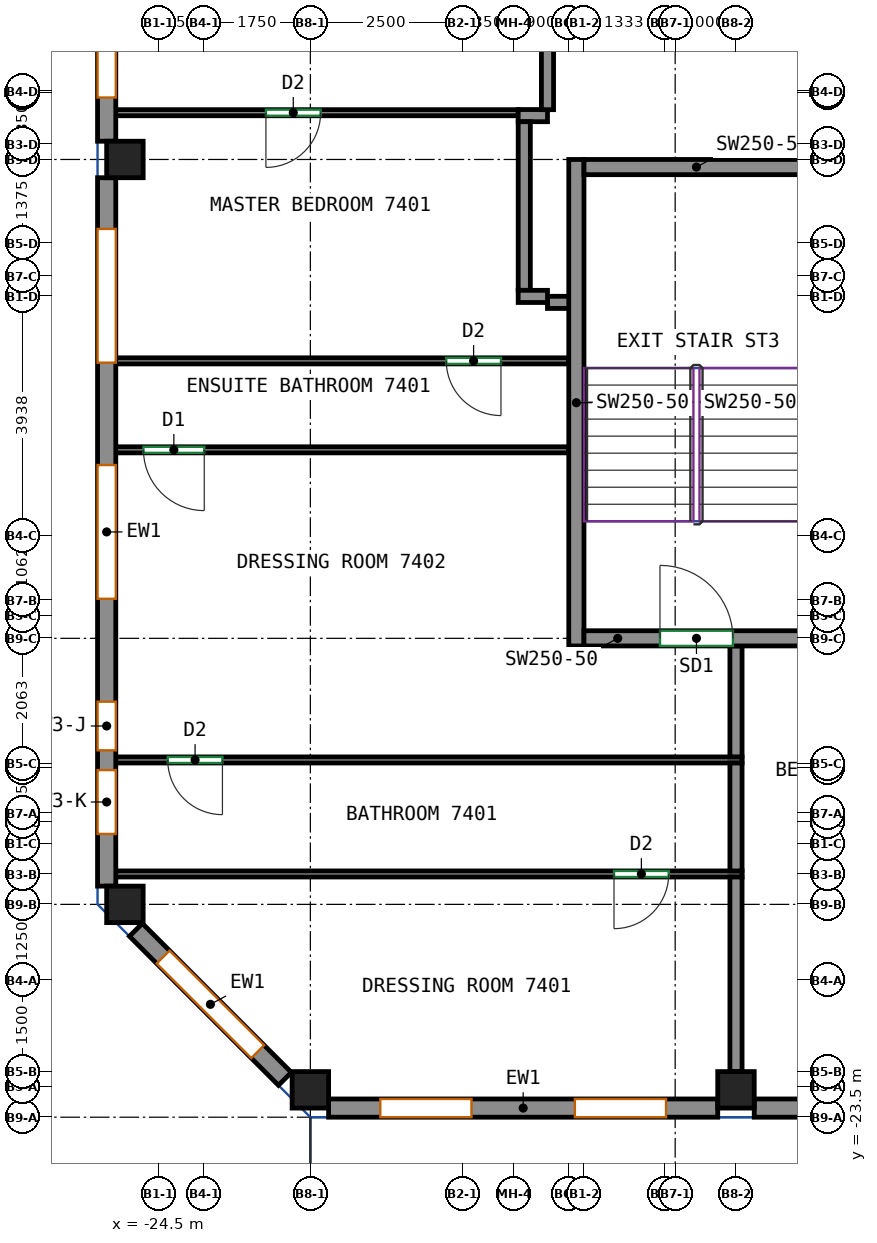
"""IFC4 building model, lengths in metres.
Left out: names, types, materials, properties, quantities, classifications, styles, units other than length and angle.
Written with IfcOpenShell. Run it as: python <this file> out.ifc"""

import sys

from ifc_helpers import new_model, si_unit, direction, frame, frame_2d, origin, origin_2d, place, context, subcontext, project, spatial, rectangle, extrude, source, transform, mapped, element, fill, save


model = new_model("IFC4")
c1 = context("Model", 3, precision=1e-05, world=origin(), true_north=direction((0.0, 1.0)))
c2 = subcontext(c1, "Body", "Model", "MODEL_VIEW")
j1 = project(units=[si_unit("LENGTHUNIT", "METRE"), si_unit("PLANEANGLEUNIT", "RADIAN")], contexts=[c1])
p1 = place(None, origin())
s1 = spatial("IfcSite", under=j1, at=p1, CompositionType="ELEMENT")
p2 = place(p1, origin())
s2 = spatial("IfcBuilding", under=s1, at=p2, CompositionType="ELEMENT")
p3 = place(p2, frame((0.0, 0.0, 298.4)))
s3 = spatial("IfcBuildingStorey", under=s2, at=p3, CompositionType="ELEMENT", Elevation=298.4)
m1 = source(origin(), c2, "Body", "SweptSolid", [
    extrude(rectangle(XDim=0.6, YDim=0.6, at=origin_2d()), origin(), (0.0, 0.0, 1.0), 3.12),
])
for number, where, z_axis, x_axis in (
    (1, (-25.05, -20.0, 0.0), (0.0, 0.0, 1.0), (1.0, 0.0, 0.0)),
    (2, (-25.05, -7.75, 0.0), (0.0, 0.0, 1.0), (1.0, 0.0, 0.0)),
    (3, (-22.0, -23.05, 0.0), (0.0, 0.0, 1.0), (1.0, 0.0, 0.0)),
    (4, (-15.0, -23.05, 0.0), (0.0, 0.0, 1.0), (1.0, 0.0, 0.0)),
):
    element("IfcColumn", number, at=place(p3, frame(where, z_axis=z_axis, x_axis=x_axis)), inside=s3, PredefinedType="COLUMN", context=c2, shape_type="MappedRepresentation", body=[
        mapped(m1, transform((0.0, 0.0, 0.0))),
    ])
m2 = source(origin(), c2, "Body", "SweptSolid", [
    extrude(rectangle(XDim=8.0, YDim=0.25, at=frame_2d((4.0, 0.0))), origin(), (0.0, 0.0, 1.0), 3.12),
])
p4 = place(p3, frame((-17.625, -15.75, 0.0), z_axis=(0.0, 0.0, 1.0), x_axis=(0.0, 1.0, 0.0)))
e5 = element("IfcWall", 5, at=p4, inside=s3, PredefinedType="SHEAR", context=c2, shape_type="MappedRepresentation", body=[
    mapped(m2, transform((0.0, 0.0, 0.0))),
])
m3 = source(origin(), c2, "Body", "SweptSolid", [
    extrude(rectangle(XDim=3.7, YDim=0.25, at=frame_2d((1.85, 0.0))), origin(), (0.0, 0.0, 1.0), 3.12),
])
p5 = place(p3, frame((-17.5, -15.625, 0.0), z_axis=(0.0, 0.0, 1.0), x_axis=(1.0, 0.0, 0.0)))
e6 = element("IfcWall", 6, at=p5, inside=s3, PredefinedType="SHEAR", context=c2, shape_type="MappedRepresentation", body=[
    mapped(m3, transform((0.0, 0.0, 0.0))),
])
p6 = place(p5, frame((1.25, 0.0, 0.0)))
e7 = element("IfcOpeningElement", 7, at=p6, cuts=e6, PredefinedType="OPENING", context=c2, shape_type="SweptSolid", body=[
    extrude(rectangle(XDim=1.2, YDim=2.1, at=frame_2d((0.6, 1.05))), frame((0.0, 0.135, 0.0), z_axis=(0.0, -1.0, 0.0), x_axis=(1.0, 0.0, 0.0)), (0.0, 0.0, 1.0), 0.27),
])
p7 = place(p3, frame((-17.5, -7.875, 0.0), z_axis=(0.0, 0.0, 1.0), x_axis=(1.0, 0.0, 0.0)))
e8 = element("IfcWall", 8, at=p7, inside=s3, PredefinedType="SHEAR", context=c2, shape_type="MappedRepresentation", body=[
    mapped(m3, transform((0.0, 0.0, 0.0))),
])
m4 = source(origin(), c2, "Body", "SweptSolid", [
    extrude(rectangle(XDim=6.4, YDim=0.3, at=frame_2d((3.2, 0.0))), origin(), (0.0, 0.0, 1.0), 3.12),
])
p8 = place(p3, frame((-21.7, -23.35, 0.0), z_axis=(0.0, 0.0, 1.0), x_axis=(1.0, 0.0, 0.0)))
e9 = element("IfcWall", 9, at=p8, inside=s3, PredefinedType="SOLIDWALL", context=c2, shape_type="MappedRepresentation", body=[
    mapped(m4, transform((0.0, 0.0, 0.0))),
])
p9 = place(p8, frame((0.85, 0.0, 0.8)))
e10 = element("IfcOpeningElement", 10, at=p9, cuts=e9, PredefinedType="OPENING", context=c2, shape_type="SweptSolid", body=[
    extrude(rectangle(XDim=1.5, YDim=2.05, at=frame_2d((0.75, 1.025))), frame((0.0, 0.16, 0.0), z_axis=(0.0, -1.0, 0.0), x_axis=(1.0, 0.0, 0.0)), (0.0, 0.0, 1.0), 0.32),
])
p10 = place(p8, frame((4.05, 0.0, 0.8)))
e11 = element("IfcOpeningElement", 11, at=p10, cuts=e9, PredefinedType="OPENING", context=c2, shape_type="SweptSolid", body=[
    extrude(rectangle(XDim=1.5, YDim=2.05, at=frame_2d((0.75, 1.025))), frame((0.0, 0.16, 0.0), z_axis=(0.0, -1.0, 0.0), x_axis=(1.0, 0.0, 0.0)), (0.0, 0.0, 1.0), 0.32),
])
p11 = place(p3, frame((-14.7, -23.35, 0.0), z_axis=(0.0, 0.0, 1.0), x_axis=(1.0, 0.0, 0.0)))
e12 = element("IfcWall", 12, at=p11, inside=s3, PredefinedType="SOLIDWALL", context=c2, shape_type="MappedRepresentation", body=[
    mapped(m4, transform((0.0, 0.0, 0.0))),
])
p12 = place(p11, frame((0.85, 0.0, 0.8)))
e13 = element("IfcOpeningElement", 13, at=p12, cuts=e12, PredefinedType="OPENING", context=c2, shape_type="SweptSolid", body=[
    extrude(rectangle(XDim=1.5, YDim=2.05, at=frame_2d((0.75, 1.025))), frame((0.0, 0.16, 0.0), z_axis=(0.0, -1.0, 0.0), x_axis=(1.0, 0.0, 0.0)), (0.0, 0.0, 1.0), 0.32),
])
p13 = place(p11, frame((4.05, 0.0, 0.8)))
e14 = element("IfcOpeningElement", 14, at=p13, cuts=e12, PredefinedType="OPENING", context=c2, shape_type="SweptSolid", body=[
    extrude(rectangle(XDim=1.5, YDim=2.05, at=frame_2d((0.75, 1.025))), frame((0.0, 0.16, 0.0), z_axis=(0.0, -1.0, 0.0), x_axis=(1.0, 0.0, 0.0)), (0.0, 0.0, 1.0), 0.32),
])
m5 = source(origin(), c2, "Body", "SweptSolid", [
    extrude(rectangle(XDim=7.275, YDim=0.3, at=frame_2d((3.637, 0.0))), origin(), (0.0, 0.0, 1.0), 3.12),
])
p14 = place(p3, frame((-25.35, -0.175, 0.0), z_axis=(0.0, 0.0, 1.0), x_axis=(0.0, -1.0, 0.0)))
e15 = element("IfcWall", 15, at=p14, inside=s3, PredefinedType="SOLIDWALL", context=c2, shape_type="MappedRepresentation", body=[
    mapped(m5, transform((0.0, 0.0, 0.0))),
])
p15 = place(p14, frame((0.719, 0.0, 0.8)))
e16 = element("IfcOpeningElement", 16, at=p15, cuts=e15, PredefinedType="OPENING", context=c2, shape_type="SweptSolid", body=[
    extrude(rectangle(XDim=2.2, YDim=2.05, at=frame_2d((1.1, 1.025))), frame((0.0, 0.16, 0.0), z_axis=(0.0, -1.0, 0.0), x_axis=(1.0, 0.0, 0.0)), (0.0, 0.0, 1.0), 0.32),
])
p16 = place(p14, frame((4.356, 0.0, 0.8)))
e17 = element("IfcOpeningElement", 17, at=p16, cuts=e15, PredefinedType="OPENING", context=c2, shape_type="SweptSolid", body=[
    extrude(rectangle(XDim=2.2, YDim=2.05, at=frame_2d((1.1, 1.025))), frame((0.0, 0.16, 0.0), z_axis=(0.0, -1.0, 0.0), x_axis=(1.0, 0.0, 0.0)), (0.0, 0.0, 1.0), 0.32),
])
m6 = source(origin(), c2, "Body", "SweptSolid", [
    extrude(rectangle(XDim=11.65, YDim=0.3, at=frame_2d((5.825, 0.0))), origin(), (0.0, 0.0, 1.0), 3.12),
])
p17 = place(p3, frame((-25.35, -8.05, 0.0), z_axis=(0.0, 0.0, 1.0), x_axis=(0.0, -1.0, 0.0)))
e18 = element("IfcWall", 18, at=p17, inside=s3, PredefinedType="SOLIDWALL", context=c2, shape_type="MappedRepresentation", body=[
    mapped(m6, transform((0.0, 0.0, 0.0))),
])
p18 = place(p17, frame((0.842, 0.0, 0.8)))
e19 = element("IfcOpeningElement", 19, at=p18, cuts=e18, PredefinedType="OPENING", context=c2, shape_type="SweptSolid", body=[
    extrude(rectangle(XDim=2.2, YDim=2.05, at=frame_2d((1.1, 1.025))), frame((0.0, 0.16, 0.0), z_axis=(0.0, -1.0, 0.0), x_axis=(1.0, 0.0, 0.0)), (0.0, 0.0, 1.0), 0.32),
])
p19 = place(p17, frame((4.725, 0.0, 0.8)))
e20 = element("IfcOpeningElement", 20, at=p19, cuts=e18, PredefinedType="OPENING", context=c2, shape_type="SweptSolid", body=[
    extrude(rectangle(XDim=2.2, YDim=2.05, at=frame_2d((1.1, 1.025))), frame((0.0, 0.16, 0.0), z_axis=(0.0, -1.0, 0.0), x_axis=(1.0, 0.0, 0.0)), (0.0, 0.0, 1.0), 0.32),
])
p20 = place(p17, frame((8.617, 0.0, 0.8)))
e21 = element("IfcOpeningElement", 21, at=p20, cuts=e18, PredefinedType="OPENING", context=c2, shape_type="SweptSolid", body=[
    extrude(rectangle(XDim=0.8, YDim=2.05, at=frame_2d((0.4, 1.025))), frame((0.0, 0.16, 0.0), z_axis=(0.0, -1.0, 0.0), x_axis=(1.0, 0.0, 0.0)), (0.0, 0.0, 1.0), 0.32),
])
p21 = place(p17, frame((9.742, 0.0, 0.8)))
e22 = element("IfcOpeningElement", 22, at=p21, cuts=e18, PredefinedType="OPENING", context=c2, shape_type="SweptSolid", body=[
    extrude(rectangle(XDim=1.05, YDim=2.05, at=frame_2d((0.525, 1.025))), frame((0.0, 0.16, 0.0), z_axis=(0.0, -1.0, 0.0), x_axis=(1.0, 0.0, 0.0)), (0.0, 0.0, 1.0), 0.32),
])
m7 = source(origin(), c2, "Body", "SweptSolid", [
    extrude(rectangle(XDim=3.465, YDim=0.3, at=frame_2d((1.732, 0.0))), origin(), (0.0, 0.0, 1.0), 3.12),
])
p22 = place(p3, frame((-24.869, -20.419, 0.0), z_axis=(0.0, 0.0, 1.0), x_axis=(0.707106781187, -0.707106781187, 0.0)))
e23 = element("IfcWall", 23, at=p22, inside=s3, PredefinedType="SOLIDWALL", context=c2, shape_type="MappedRepresentation", body=[
    mapped(m7, transform((0.0, 0.0, 0.0))),
])
p23 = place(p22, frame((0.632, 0.0, 0.8)))
e24 = element("IfcOpeningElement", 24, at=p23, cuts=e23, PredefinedType="OPENING", context=c2, shape_type="SweptSolid", body=[
    extrude(rectangle(XDim=2.2, YDim=2.05, at=frame_2d((1.1, 1.025))), frame((0.0, 0.16, 0.0), z_axis=(0.0, -1.0, 0.0), x_axis=(1.0, 0.0, 0.0)), (0.0, 0.0, 1.0), 0.32),
])
p24 = place(p3, frame((-14.9, -19.5, 0.0), z_axis=(0.0, 0.0, 1.0), x_axis=(-1.0, 0.0, 0.0)))
e25 = element("IfcWall", 25, at=p24, inside=s3, PredefinedType="PARTITIONING", context=c2, shape_type="SweptSolid", body=[
    extrude(rectangle(XDim=10.35, YDim=0.1, at=frame_2d((5.175, 0.0))), origin(), (0.0, 0.0, 1.0), 3.12),
])
p25 = place(p24, frame((1.206, 0.0, 0.0)))
e26 = element("IfcOpeningElement", 26, at=p25, cuts=e25, PredefinedType="OPENING", context=c2, shape_type="SweptSolid", body=[
    extrude(rectangle(XDim=0.9, YDim=2.1, at=frame_2d((0.45, 1.05))), frame((0.0, 0.06, 0.0), z_axis=(0.0, -1.0, 0.0), x_axis=(1.0, 0.0, 0.0)), (0.0, 0.0, 1.0), 0.12),
])
p26 = place(p3, frame((-15.0, -22.75, 0.0), z_axis=(0.0, 0.0, 1.0), x_axis=(0.0, 1.0, 0.0)))
e27 = element("IfcWall", 27, at=p26, inside=s3, PredefinedType="PARTITIONING", context=c2, shape_type="SweptSolid", body=[
    extrude(rectangle(XDim=3.2, YDim=0.2, at=frame_2d((1.6, 0.0))), origin(), (0.0, 0.0, 1.0), 3.12),
])
p27 = place(p3, frame((-14.9, -17.625, 0.0), z_axis=(0.0, 0.0, 1.0), x_axis=(-1.0, 0.0, 0.0)))
e28 = element("IfcWall", 28, at=p27, inside=s3, PredefinedType="PARTITIONING", context=c2, shape_type="SweptSolid", body=[
    extrude(rectangle(XDim=10.35, YDim=0.1, at=frame_2d((5.175, 0.0))), origin(), (0.0, 0.0, 1.0), 3.12),
])
p28 = place(p27, frame((8.546, 0.0, 0.0)))
e29 = element("IfcOpeningElement", 29, at=p28, cuts=e28, PredefinedType="OPENING", context=c2, shape_type="SweptSolid", body=[
    extrude(rectangle(XDim=0.9, YDim=2.1, at=frame_2d((0.45, 1.05))), frame((0.0, 0.06, 0.0), z_axis=(0.0, -1.0, 0.0), x_axis=(1.0, 0.0, 0.0)), (0.0, 0.0, 1.0), 0.12),
])
p29 = place(p3, frame((-15.0, -19.45, 0.0), z_axis=(0.0, 0.0, 1.0), x_axis=(0.0, 1.0, 0.0)))
e30 = element("IfcWall", 30, at=p29, inside=s3, PredefinedType="PARTITIONING", context=c2, shape_type="SweptSolid", body=[
    extrude(rectangle(XDim=1.775, YDim=0.2, at=frame_2d((0.887, 0.0))), origin(), (0.0, 0.0, 1.0), 3.12),
])
p30 = place(p3, frame((-17.75, -12.525, 0.0), z_axis=(0.0, 0.0, 1.0), x_axis=(-1.0, 0.0, 0.0)))
e31 = element("IfcWall", 31, at=p30, inside=s3, PredefinedType="PARTITIONING", context=c2, shape_type="SweptSolid", body=[
    extrude(rectangle(XDim=7.5, YDim=0.1, at=frame_2d((3.75, 0.0))), origin(), (0.0, 0.0, 1.0), 3.12),
])
p31 = place(p30, frame((5.995, 0.0, 0.0)))
e32 = element("IfcOpeningElement", 32, at=p31, cuts=e31, PredefinedType="OPENING", context=c2, shape_type="SweptSolid", body=[
    extrude(rectangle(XDim=1.0, YDim=2.1, at=frame_2d((0.5, 1.05))), frame((0.0, 0.06, 0.0), z_axis=(0.0, -1.0, 0.0), x_axis=(1.0, 0.0, 0.0)), (0.0, 0.0, 1.0), 0.12),
])
p32 = place(p3, frame((-15.0, -17.575, 0.0), z_axis=(0.0, 0.0, 1.0), x_axis=(0.0, 1.0, 0.0)))
e33 = element("IfcWall", 33, at=p32, inside=s3, PredefinedType="PARTITIONING", context=c2, shape_type="SweptSolid", body=[
    extrude(rectangle(XDim=1.825, YDim=0.2, at=frame_2d((0.913, 0.0))), origin(), (0.0, 0.0, 1.0), 3.12),
])
p33 = place(p3, frame((-17.75, -11.062, 0.0), z_axis=(0.0, 0.0, 1.0), x_axis=(-1.0, 0.0, 0.0)))
e34 = element("IfcWall", 34, at=p33, inside=s3, PredefinedType="PARTITIONING", context=c2, shape_type="SweptSolid", body=[
    extrude(rectangle(XDim=7.5, YDim=0.1, at=frame_2d((3.75, 0.0))), origin(), (0.0, 0.0, 1.0), 3.12),
])
p34 = place(p33, frame((1.115, 0.0, 0.0)))
e35 = element("IfcOpeningElement", 35, at=p34, cuts=e34, PredefinedType="OPENING", context=c2, shape_type="SweptSolid", body=[
    extrude(rectangle(XDim=0.9, YDim=2.1, at=frame_2d((0.45, 1.05))), frame((0.0, 0.06, 0.0), z_axis=(0.0, -1.0, 0.0), x_axis=(1.0, 0.0, 0.0)), (0.0, 0.0, 1.0), 0.12),
])
p35 = place(p3, frame((-18.582, -6.981, 0.0), z_axis=(0.0, 0.0, 1.0), x_axis=(-1.0, 0.0, 0.0)))
e36 = element("IfcWall", 36, at=p35, inside=s3, PredefinedType="PARTITIONING", context=c2, shape_type="SweptSolid", body=[
    extrude(rectangle(XDim=6.668, YDim=0.1, at=frame_2d((3.334, 0.0))), origin(), (0.0, 0.0, 1.0), 3.12),
])
p36 = place(p35, frame((3.249, 0.0, 0.0)))
e37 = element("IfcOpeningElement", 37, at=p36, cuts=e36, PredefinedType="OPENING", context=c2, shape_type="SweptSolid", body=[
    extrude(rectangle(XDim=0.9, YDim=2.1, at=frame_2d((0.45, 1.05))), frame((0.0, 0.06, 0.0), z_axis=(0.0, -1.0, 0.0), x_axis=(1.0, 0.0, 0.0)), (0.0, 0.0, 1.0), 0.12),
])
p37 = place(p3, frame((-17.7, -10.1, 0.0), z_axis=(0.0, 0.0, 1.0), x_axis=(-1.0, 0.0, 0.0)))
e38 = element("IfcWall", 38, at=p37, inside=s3, PredefinedType="PARTITIONING", context=c2, shape_type="SweptSolid", body=[
    extrude(rectangle(XDim=0.4, YDim=0.2, at=frame_2d((0.2, 0.0))), origin(), (0.0, 0.0, 1.0), 3.12),
])
p38 = place(p3, frame((-18.582, -7.029, 0.0), z_axis=(0.0, 0.0, 1.0), x_axis=(1.0, 0.0, 0.0)))
e39 = element("IfcWall", 39, at=p38, inside=s3, PredefinedType="PARTITIONING", context=c2, shape_type="SweptSolid", body=[
    extrude(rectangle(XDim=0.482, YDim=0.2, at=frame_2d((0.241, 0.0))), origin(), (0.0, 0.0, 1.0), 3.12),
])
p39 = place(p3, frame((-18.482, -9.902, 0.0), z_axis=(0.0, 0.0, 1.0), x_axis=(0.0, 1.0, 0.0)))
e40 = element("IfcWall", 40, at=p39, inside=s3, PredefinedType="PARTITIONING", context=c2, shape_type="SweptSolid", body=[
    extrude(rectangle(XDim=2.773, YDim=0.2, at=frame_2d((1.387, 0.0))), origin(), (0.0, 0.0, 1.0), 3.12),
])
p40 = place(p3, frame((-18.1, -10.002, 0.0), z_axis=(0.0, 0.0, 1.0), x_axis=(-1.0, 0.0, 0.0)))
e41 = element("IfcWall", 41, at=p40, inside=s3, PredefinedType="PARTITIONING", context=c2, shape_type="SweptSolid", body=[
    extrude(rectangle(XDim=0.482, YDim=0.2, at=frame_2d((0.241, 0.0))), origin(), (0.0, 0.0, 1.0), 3.12),
])
p41 = place(p3, frame((-18.1, -6.931, 0.0), z_axis=(0.0, 0.0, 1.0), x_axis=(0.0, 1.0, 0.0)))
e42 = element("IfcWall", 42, at=p41, inside=s3, PredefinedType="PARTITIONING", context=c2, shape_type="SweptSolid", body=[
    extrude(rectangle(XDim=7.775, YDim=0.2, at=frame_2d((3.887, 0.0))), origin(), (0.0, 0.0, 1.0), 3.12),
])
p42 = place(p9, origin())
e43 = element("IfcWindow", 43, at=p42, inside=s3, PartitioningType="SINGLE_PANEL", PredefinedType="WINDOW", context=c2, shape_type="SweptSolid", body=[
    extrude(rectangle(XDim=1.5, YDim=2.05, at=frame_2d((0.75, 1.025))), frame((0.0, 0.03, 0.0), z_axis=(0.0, -1.0, 0.0), x_axis=(1.0, 0.0, 0.0)), (0.0, 0.0, 1.0), 0.06),
])
fill(e10, e43)
p43 = place(p10, origin())
e44 = element("IfcWindow", 44, at=p43, inside=s3, PartitioningType="SINGLE_PANEL", PredefinedType="WINDOW", context=c2, shape_type="SweptSolid", body=[
    extrude(rectangle(XDim=1.5, YDim=2.05, at=frame_2d((0.75, 1.025))), frame((0.0, 0.03, 0.0), z_axis=(0.0, -1.0, 0.0), x_axis=(1.0, 0.0, 0.0)), (0.0, 0.0, 1.0), 0.06),
])
fill(e11, e44)
p44 = place(p16, origin())
e45 = element("IfcWindow", 45, at=p44, inside=s3, PartitioningType="SINGLE_PANEL", PredefinedType="WINDOW", context=c2, shape_type="SweptSolid", body=[
    extrude(rectangle(XDim=2.2, YDim=2.05, at=frame_2d((1.1, 1.025))), frame((0.0, 0.03, 0.0), z_axis=(0.0, -1.0, 0.0), x_axis=(1.0, 0.0, 0.0)), (0.0, 0.0, 1.0), 0.06),
])
fill(e17, e45)
p45 = place(p18, origin())
e46 = element("IfcWindow", 46, at=p45, inside=s3, PartitioningType="SINGLE_PANEL", PredefinedType="WINDOW", context=c2, shape_type="SweptSolid", body=[
    extrude(rectangle(XDim=2.2, YDim=2.05, at=frame_2d((1.1, 1.025))), frame((0.0, 0.03, 0.0), z_axis=(0.0, -1.0, 0.0), x_axis=(1.0, 0.0, 0.0)), (0.0, 0.0, 1.0), 0.06),
])
fill(e19, e46)
p46 = place(p19, origin())
e47 = element("IfcWindow", 47, at=p46, inside=s3, PartitioningType="SINGLE_PANEL", PredefinedType="WINDOW", context=c2, shape_type="SweptSolid", body=[
    extrude(rectangle(XDim=2.2, YDim=2.05, at=frame_2d((1.1, 1.025))), frame((0.0, 0.03, 0.0), z_axis=(0.0, -1.0, 0.0), x_axis=(1.0, 0.0, 0.0)), (0.0, 0.0, 1.0), 0.06),
])
fill(e20, e47)
p47 = place(p20, origin())
e48 = element("IfcWindow", 48, at=p47, inside=s3, PartitioningType="SINGLE_PANEL", PredefinedType="WINDOW", context=c2, shape_type="SweptSolid", body=[
    extrude(rectangle(XDim=0.8, YDim=2.05, at=frame_2d((0.4, 1.025))), frame((0.0, 0.03, 0.0), z_axis=(0.0, -1.0, 0.0), x_axis=(1.0, 0.0, 0.0)), (0.0, 0.0, 1.0), 0.06),
])
fill(e21, e48)
p48 = place(p23, origin())
e49 = element("IfcWindow", 49, at=p48, inside=s3, PartitioningType="SINGLE_PANEL", PredefinedType="WINDOW", context=c2, shape_type="SweptSolid", body=[
    extrude(rectangle(XDim=2.2, YDim=2.05, at=frame_2d((1.1, 1.025))), frame((0.0, 0.03, 0.0), z_axis=(0.0, -1.0, 0.0), x_axis=(1.0, 0.0, 0.0)), (0.0, 0.0, 1.0), 0.06),
])
fill(e24, e49)
p49 = place(p6, origin())
e50 = element("IfcDoor", 50, at=p49, inside=s3, OperationType="DOUBLE_DOOR_SINGLE_SWING", PredefinedType="DOOR", context=c2, shape_type="SweptSolid", body=[
    extrude(rectangle(XDim=1.2, YDim=2.1, at=frame_2d((0.6, 1.05))), frame((0.0, 0.025, 0.0), z_axis=(0.0, -1.0, 0.0), x_axis=(1.0, 0.0, 0.0)), (0.0, 0.0, 1.0), 0.05),
])
fill(e7, e50)
p50 = place(p25, origin())
e51 = element("IfcDoor", 51, at=p50, inside=s3, OperationType="SINGLE_SWING_RIGHT", PredefinedType="DOOR", context=c2, shape_type="SweptSolid", body=[
    extrude(rectangle(XDim=0.9, YDim=2.1, at=frame_2d((0.45, 1.05))), frame((0.0, 0.025, 0.0), z_axis=(0.0, -1.0, 0.0), x_axis=(1.0, 0.0, 0.0)), (0.0, 0.0, 1.0), 0.05),
])
fill(e26, e51)
p51 = place(p28, origin())
e52 = element("IfcDoor", 52, at=p51, inside=s3, OperationType="SINGLE_SWING_LEFT", PredefinedType="DOOR", context=c2, shape_type="SweptSolid", body=[
    extrude(rectangle(XDim=0.9, YDim=2.1, at=frame_2d((0.45, 1.05))), frame((0.0, 0.025, 0.0), z_axis=(0.0, -1.0, 0.0), x_axis=(1.0, 0.0, 0.0)), (0.0, 0.0, 1.0), 0.05),
])
fill(e29, e52)
p52 = place(p31, origin())
e53 = element("IfcDoor", 53, at=p52, inside=s3, OperationType="SINGLE_SWING_LEFT", PredefinedType="DOOR", context=c2, shape_type="SweptSolid", body=[
    extrude(rectangle(XDim=1.0, YDim=2.1, at=frame_2d((0.5, 1.05))), frame((0.0, 0.025, 0.0), z_axis=(0.0, -1.0, 0.0), x_axis=(1.0, 0.0, 0.0)), (0.0, 0.0, 1.0), 0.05),
])
fill(e32, e53)
p53 = place(p34, origin())
e54 = element("IfcDoor", 54, at=p53, inside=s3, OperationType="SINGLE_SWING_LEFT", PredefinedType="DOOR", context=c2, shape_type="SweptSolid", body=[
    extrude(rectangle(XDim=0.9, YDim=2.1, at=frame_2d((0.45, 1.05))), frame((0.0, 0.025, 0.0), z_axis=(0.0, -1.0, 0.0), x_axis=(1.0, 0.0, 0.0)), (0.0, 0.0, 1.0), 0.05),
])
fill(e35, e54)
p54 = place(p36, origin())
e55 = element("IfcDoor", 55, at=p54, inside=s3, OperationType="SINGLE_SWING_RIGHT", PredefinedType="DOOR", context=c2, shape_type="SweptSolid", body=[
    extrude(rectangle(XDim=0.9, YDim=2.1, at=frame_2d((0.45, 1.05))), frame((0.0, 0.025, 0.0), z_axis=(0.0, -1.0, 0.0), x_axis=(1.0, 0.0, 0.0)), (0.0, 0.0, 1.0), 0.05),
])
fill(e37, e55)
p55 = place(p21, origin())
e56 = element("IfcWindow", 56, at=p55, inside=s3, PartitioningType="SINGLE_PANEL", PredefinedType="WINDOW", context=c2, shape_type="SweptSolid", body=[
    extrude(rectangle(XDim=1.05, YDim=2.05, at=frame_2d((0.525, 1.025))), frame((0.0, 0.03, 0.0), z_axis=(0.0, -1.0, 0.0), x_axis=(1.0, 0.0, 0.0)), (0.0, 0.0, 1.0), 0.06),
])
fill(e22, e56)
save(model, sys.argv[1])
